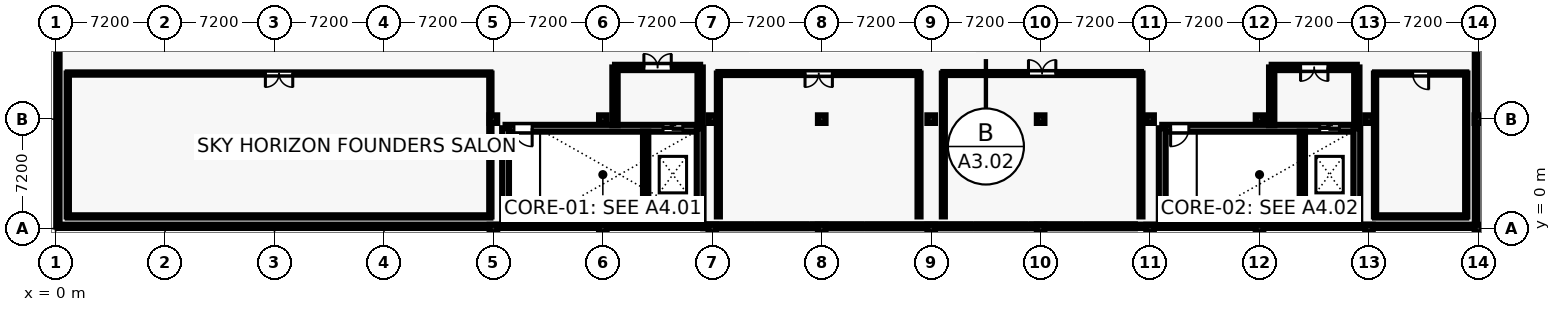
"""IFC4 building model, lengths in metres.
Left out: names, types, materials, properties, quantities, classifications, styles, units other than length and angle.
Written with IfcOpenShell. Run it as: python <this file> out.ifc"""

import sys

from ifc_helpers import new_model, si_unit, direction, frame, frame_2d, origin, origin_2d, place, context, subcontext, project, spatial, rectangle, extrude, element, fill, save


model = new_model("IFC4")
c1 = context("Model", 3, precision=1e-05, world=origin(), true_north=direction((0.0, 1.0)))
c2 = subcontext(c1, "Body", "Model", "MODEL_VIEW")
j1 = project(units=[si_unit("LENGTHUNIT", "METRE"), si_unit("PLANEANGLEUNIT", "RADIAN")], contexts=[c1])
p1 = place(None, origin())
s1 = spatial("IfcSite", under=j1, at=p1, CompositionType="ELEMENT")
p2 = place(p1, origin())
s2 = spatial("IfcBuilding", under=s1, at=p2, CompositionType="ELEMENT")
p3 = place(p2, frame((0.0, 0.0, 23.0)))
s3 = spatial("IfcBuildingStorey", under=s2, at=p3, CompositionType="ELEMENT", Elevation=23.0)
for number, where, z_axis, x_axis in (
    (1, (28.8, 0.0, 0.0), (0.0, 0.0, 1.0), (1.0, 0.0, 0.0)),
    (2, (28.8, 7.2, 0.0), (0.0, 0.0, 1.0), (1.0, 0.0, 0.0)),
    (3, (36.0, 0.0, 0.0), (0.0, 0.0, 1.0), (1.0, 0.0, 0.0)),
    (4, (36.0, 7.2, 0.0), (0.0, 0.0, 1.0), (1.0, 0.0, 0.0)),
    (5, (43.2, 0.0, 0.0), (0.0, 0.0, 1.0), (1.0, 0.0, 0.0)),
    (6, (43.2, 7.2, 0.0), (0.0, 0.0, 1.0), (1.0, 0.0, 0.0)),
    (7, (50.4, 0.0, 0.0), (0.0, 0.0, 1.0), (1.0, 0.0, 0.0)),
    (8, (50.4, 7.2, 0.0), (0.0, 0.0, 1.0), (1.0, 0.0, 0.0)),
    (9, (57.6, 0.0, 0.0), (0.0, 0.0, 1.0), (1.0, 0.0, 0.0)),
    (10, (57.6, 7.2, 0.0), (0.0, 0.0, 1.0), (1.0, 0.0, 0.0)),
    (11, (64.8, 0.0, 0.0), (0.0, 0.0, 1.0), (1.0, 0.0, 0.0)),
    (12, (64.8, 7.2, 0.0), (0.0, 0.0, 1.0), (1.0, 0.0, 0.0)),
    (13, (72.0, 0.0, 0.0), (0.0, 0.0, 1.0), (1.0, 0.0, 0.0)),
    (14, (72.0, 7.2, 0.0), (0.0, 0.0, 1.0), (1.0, 0.0, 0.0)),
    (15, (79.2, 0.0, 0.0), (0.0, 0.0, 1.0), (1.0, 0.0, 0.0)),
    (16, (79.2, 7.2, 0.0), (0.0, 0.0, 1.0), (1.0, 0.0, 0.0)),
    (17, (86.4, 0.0, 0.0), (0.0, 0.0, 1.0), (1.0, 0.0, 0.0)),
    (18, (86.4, 7.2, 0.0), (0.0, 0.0, 1.0), (1.0, 0.0, 0.0)),
    (19, (93.6, 0.0, 0.0), (0.0, 0.0, 1.0), (1.0, 0.0, 0.0)),
    (20, (93.6, 7.2, 0.0), (0.0, 0.0, 1.0), (1.0, 0.0, 0.0)),
):
    element("IfcColumn", number, at=place(p3, frame(where, z_axis=z_axis, x_axis=x_axis)), inside=s3, PredefinedType="COLUMN", context=c2, shape_type="SweptSolid", body=[
        extrude(rectangle(XDim=0.5, YDim=0.5, at=origin_2d()), origin(), (0.0, 0.0, 1.0), 4.5),
    ])
p4 = place(p3, frame((29.6, 0.5, 0.0), z_axis=(0.0, 0.0, 1.0), x_axis=(1.0, 0.0, 0.0)))
e21 = element("IfcWall", 21, at=p4, inside=s3, PredefinedType="SHEAR", context=c2, shape_type="SweptSolid", body=[
    extrude(rectangle(XDim=12.8, YDim=0.45, at=frame_2d((6.4, 0.0))), origin(), (0.0, 0.0, 1.0), 4.28),
])
p5 = place(p3, frame((29.6, 6.6, 0.0), z_axis=(0.0, 0.0, 1.0), x_axis=(1.0, 0.0, 0.0)))
e22 = element("IfcWall", 22, at=p5, inside=s3, PredefinedType="SHEAR", context=c2, shape_type="SweptSolid", body=[
    extrude(rectangle(XDim=12.8, YDim=0.45, at=frame_2d((6.4, 0.0))), origin(), (0.0, 0.0, 1.0), 4.28),
])
p6 = place(p5, frame((0.55, 0.0, 0.0)))
e23 = element("IfcOpeningElement", 23, at=p6, cuts=e22, PredefinedType="OPENING", context=c2, shape_type="SweptSolid", body=[
    extrude(rectangle(XDim=1.2, YDim=2.25, at=frame_2d((0.6, 1.125))), frame((0.0, 0.235, 0.0), z_axis=(0.0, -1.0, 0.0), x_axis=(1.0, 0.0, 0.0)), (0.0, 0.0, 1.0), 0.47),
])
p7 = place(p5, frame((10.358, 0.0, 0.0)))
e24 = element("IfcOpeningElement", 24, at=p7, cuts=e22, PredefinedType="OPENING", context=c2, shape_type="SweptSolid", body=[
    extrude(rectangle(XDim=1.3, YDim=2.25, at=frame_2d((0.65, 1.125))), frame((0.0, 0.235, 0.0), z_axis=(0.0, -1.0, 0.0), x_axis=(1.0, 0.0, 0.0)), (0.0, 0.0, 1.0), 0.47),
])
for number, where, z_axis, x_axis in (
    (25, (29.6, 0.5, 0.0), (0.0, 0.0, 1.0), (0.0, 1.0, 0.0)),
    (26, (42.4, 0.5, 0.0), (0.0, 0.0, 1.0), (0.0, 1.0, 0.0)),
):
    element("IfcWall", number, at=place(p3, frame(where, z_axis=z_axis, x_axis=x_axis)), inside=s3, PredefinedType="SHEAR", context=c2, shape_type="SweptSolid", body=[
        extrude(rectangle(XDim=6.1, YDim=0.45, at=frame_2d((3.05, 0.0))), origin(), (0.0, 0.0, 1.0), 4.28),
    ])
p8 = place(p3, frame((38.816, 0.725, 0.0), z_axis=(0.0, 0.0, 1.0), x_axis=(0.0, 1.0, 0.0)))
e27 = element("IfcWall", 27, at=p8, inside=s3, PredefinedType="SHEAR", context=c2, shape_type="SweptSolid", body=[
    extrude(rectangle(XDim=5.65, YDim=0.35, at=frame_2d((2.825, 0.0))), origin(), (0.0, 0.0, 1.0), 4.28),
])
p9 = place(p3, frame((72.8, 0.5, 0.0), z_axis=(0.0, 0.0, 1.0), x_axis=(1.0, 0.0, 0.0)))
e28 = element("IfcWall", 28, at=p9, inside=s3, PredefinedType="SHEAR", context=c2, shape_type="SweptSolid", body=[
    extrude(rectangle(XDim=12.8, YDim=0.45, at=frame_2d((6.4, 0.0))), origin(), (0.0, 0.0, 1.0), 4.28),
])
p10 = place(p3, frame((72.8, 6.6, 0.0), z_axis=(0.0, 0.0, 1.0), x_axis=(1.0, 0.0, 0.0)))
e29 = element("IfcWall", 29, at=p10, inside=s3, PredefinedType="SHEAR", context=c2, shape_type="SweptSolid", body=[
    extrude(rectangle(XDim=12.8, YDim=0.45, at=frame_2d((6.4, 0.0))), origin(), (0.0, 0.0, 1.0), 4.28),
])
p11 = place(p10, frame((0.55, 0.0, 0.0)))
e30 = element("IfcOpeningElement", 30, at=p11, cuts=e29, PredefinedType="OPENING", context=c2, shape_type="SweptSolid", body=[
    extrude(rectangle(XDim=1.2, YDim=2.25, at=frame_2d((0.6, 1.125))), frame((0.0, 0.235, 0.0), z_axis=(0.0, -1.0, 0.0), x_axis=(1.0, 0.0, 0.0)), (0.0, 0.0, 1.0), 0.47),
])
p12 = place(p10, frame((10.358, 0.0, 0.0)))
e31 = element("IfcOpeningElement", 31, at=p12, cuts=e29, PredefinedType="OPENING", context=c2, shape_type="SweptSolid", body=[
    extrude(rectangle(XDim=1.3, YDim=2.25, at=frame_2d((0.65, 1.125))), frame((0.0, 0.235, 0.0), z_axis=(0.0, -1.0, 0.0), x_axis=(1.0, 0.0, 0.0)), (0.0, 0.0, 1.0), 0.47),
])
for number, where, z_axis, x_axis in (
    (32, (72.8, 0.5, 0.0), (0.0, 0.0, 1.0), (0.0, 1.0, 0.0)),
    (33, (85.6, 0.5, 0.0), (0.0, 0.0, 1.0), (0.0, 1.0, 0.0)),
):
    element("IfcWall", number, at=place(p3, frame(where, z_axis=z_axis, x_axis=x_axis)), inside=s3, PredefinedType="SHEAR", context=c2, shape_type="SweptSolid", body=[
        extrude(rectangle(XDim=6.1, YDim=0.45, at=frame_2d((3.05, 0.0))), origin(), (0.0, 0.0, 1.0), 4.28),
    ])
p13 = place(p3, frame((82.016, 0.725, 0.0), z_axis=(0.0, 0.0, 1.0), x_axis=(0.0, 1.0, 0.0)))
e34 = element("IfcWall", 34, at=p13, inside=s3, PredefinedType="SHEAR", context=c2, shape_type="SweptSolid", body=[
    extrude(rectangle(XDim=5.65, YDim=0.35, at=frame_2d((2.825, 0.0))), origin(), (0.0, 0.0, 1.0), 4.28),
])
for number, where, z_axis, x_axis in (
    (35, (42.6, 0.15, 0.0), (0.0, 0.0, 1.0), (1.0, 0.0, 0.0)),
    (36, (46.2, 0.15, 0.0), (0.0, 0.0, 1.0), (1.0, 0.0, 0.0)),
    (37, (49.8, 0.15, 0.0), (0.0, 0.0, 1.0), (1.0, 0.0, 0.0)),
):
    element("IfcWall", number, at=place(p3, frame(where, z_axis=z_axis, x_axis=x_axis)), inside=s3, PredefinedType="SOLIDWALL", context=c2, shape_type="SweptSolid", body=[
        extrude(rectangle(XDim=3.2, YDim=0.26, at=frame_2d((1.6, 0.0))), origin(), (0.0, 0.0, 1.0), 3.34),
    ])
p14 = place(p3, frame((53.4, 0.15, 0.0), z_axis=(0.0, 0.0, 1.0), x_axis=(1.0, 0.0, 0.0)))
e38 = element("IfcWall", 38, at=p14, inside=s3, PredefinedType="SOLIDWALL", context=c2, shape_type="SweptSolid", body=[
    extrude(rectangle(XDim=3.2, YDim=0.26, at=frame_2d((1.6, 0.0))), origin(), (0.0, 0.0, 1.0), 3.34),
])
for number, where, z_axis, x_axis in (
    (39, (57.0, 0.15, 0.0), (0.0, 0.0, 1.0), (1.0, 0.0, 0.0)),
    (40, (60.6, 0.15, 0.0), (0.0, 0.0, 1.0), (1.0, 0.0, 0.0)),
    (41, (64.2, 0.15, 0.0), (0.0, 0.0, 1.0), (1.0, 0.0, 0.0)),
    (42, (67.8, 0.15, 0.0), (0.0, 0.0, 1.0), (1.0, 0.0, 0.0)),
):
    element("IfcWall", number, at=place(p3, frame(where, z_axis=z_axis, x_axis=x_axis)), inside=s3, PredefinedType="SOLIDWALL", context=c2, shape_type="SweptSolid", body=[
        extrude(rectangle(XDim=3.2, YDim=0.26, at=frame_2d((1.6, 0.0))), origin(), (0.0, 0.0, 1.0), 3.34),
    ])
p15 = place(p3, frame((0.15, 0.15, 4.5), z_axis=(0.0, 0.0, 1.0), x_axis=(0.0, 1.0, 0.0)))
e43 = element("IfcWall", 43, at=p15, inside=s3, PredefinedType="PARAPET", context=c2, shape_type="SweptSolid", body=[
    extrude(rectangle(XDim=129.3, YDim=0.22, at=frame_2d((64.65, 0.0))), origin(), (0.0, 0.0, 1.0), 1.15),
])
p16 = place(p3, frame((0.15, 0.15, 4.5), z_axis=(0.0, 0.0, 1.0), x_axis=(1.0, 0.0, 0.0)))
e44 = element("IfcWall", 44, at=p16, inside=s3, PredefinedType="PARAPET", context=c2, shape_type="SweptSolid", body=[
    extrude(rectangle(XDim=93.3, YDim=0.22, at=frame_2d((46.65, 0.0))), origin(), (0.0, 0.0, 1.0), 1.15),
])
p17 = place(p3, frame((93.45, 0.15, 4.5), z_axis=(0.0, 0.0, 1.0), x_axis=(0.0, 1.0, 0.0)))
e45 = element("IfcWall", 45, at=p17, inside=s3, PredefinedType="PARAPET", context=c2, shape_type="SweptSolid", body=[
    extrude(rectangle(XDim=14.1, YDim=0.18, at=frame_2d((7.05, 0.0))), origin(), (0.0, 0.0, 1.0), 1.15),
])
p18 = place(p3, frame((42.4, 6.8, 0.0), z_axis=(0.0, 0.0, 1.0), x_axis=(0.0, 1.0, 0.0)))
e46 = element("IfcWall", 46, at=p18, inside=s3, PredefinedType="SHEAR", context=c2, shape_type="SweptSolid", body=[
    extrude(rectangle(XDim=3.8, YDim=0.35, at=frame_2d((1.9, 0.0))), origin(), (0.0, 0.0, 1.0), 3.34),
])
p19 = place(p3, frame((42.4, 10.6, 0.0), z_axis=(0.0, 0.0, 1.0), x_axis=(-1.0, 0.0, 0.0)))
e47 = element("IfcWall", 47, at=p19, inside=s3, PredefinedType="SHEAR", context=c2, shape_type="SweptSolid", body=[
    extrude(rectangle(XDim=5.6, YDim=0.35, at=frame_2d((2.8, 0.0))), origin(), (0.0, 0.0, 1.0), 3.34),
])
p20 = place(p19, frame((1.9, 0.0, 0.0)))
e48 = element("IfcOpeningElement", 48, at=p20, cuts=e47, PredefinedType="OPENING", context=c2, shape_type="SweptSolid", body=[
    extrude(rectangle(XDim=1.8, YDim=2.3, at=frame_2d((0.9, 1.15))), frame((0.0, 0.185, 0.0), z_axis=(0.0, -1.0, 0.0), x_axis=(1.0, 0.0, 0.0)), (0.0, 0.0, 1.0), 0.37),
])
for number, where, z_axis, x_axis in (
    (49, (36.8, 10.6, 0.0), (0.0, 0.0, 1.0), (0.0, -1.0, 0.0)),
    (50, (85.6, 6.8, 0.0), (0.0, 0.0, 1.0), (0.0, 1.0, 0.0)),
):
    element("IfcWall", number, at=place(p3, frame(where, z_axis=z_axis, x_axis=x_axis)), inside=s3, PredefinedType="SHEAR", context=c2, shape_type="SweptSolid", body=[
        extrude(rectangle(XDim=3.8, YDim=0.35, at=frame_2d((1.9, 0.0))), origin(), (0.0, 0.0, 1.0), 3.34),
    ])
p21 = place(p3, frame((85.6, 10.6, 0.0), z_axis=(0.0, 0.0, 1.0), x_axis=(-1.0, 0.0, 0.0)))
e51 = element("IfcWall", 51, at=p21, inside=s3, PredefinedType="SHEAR", context=c2, shape_type="SweptSolid", body=[
    extrude(rectangle(XDim=5.6, YDim=0.35, at=frame_2d((2.8, 0.0))), origin(), (0.0, 0.0, 1.0), 3.34),
])
p22 = place(p21, frame((1.9, 0.0, 0.0)))
e52 = element("IfcOpeningElement", 52, at=p22, cuts=e51, PredefinedType="OPENING", context=c2, shape_type="SweptSolid", body=[
    extrude(rectangle(XDim=1.8, YDim=2.3, at=frame_2d((0.9, 1.15))), frame((0.0, 0.185, 0.0), z_axis=(0.0, -1.0, 0.0), x_axis=(1.0, 0.0, 0.0)), (0.0, 0.0, 1.0), 0.37),
])
p23 = place(p3, frame((80.0, 10.6, 0.0), z_axis=(0.0, 0.0, 1.0), x_axis=(0.0, -1.0, 0.0)))
e53 = element("IfcWall", 53, at=p23, inside=s3, PredefinedType="SHEAR", context=c2, shape_type="SweptSolid", body=[
    extrude(rectangle(XDim=3.8, YDim=0.35, at=frame_2d((1.9, 0.0))), origin(), (0.0, 0.0, 1.0), 3.34),
])
p24 = place(p3, frame((0.8, 0.8, 0.0), z_axis=(0.0, 0.0, 1.0), x_axis=(1.0, 0.0, 0.0)))
e54 = element("IfcWall", 54, at=p24, inside=s3, PredefinedType="PARTITIONING", context=c2, shape_type="SweptSolid", body=[
    extrude(rectangle(XDim=27.8, YDim=0.15, at=frame_2d((13.9, 0.0))), origin(), (0.0, 0.0, 1.0), 3.34),
])
p25 = place(p3, frame((28.6, 0.8, 0.0), z_axis=(0.0, 0.0, 1.0), x_axis=(0.0, 1.0, 0.0)))
e55 = element("IfcWall", 55, at=p25, inside=s3, PredefinedType="PARTITIONING", context=c2, shape_type="SweptSolid", body=[
    extrude(rectangle(XDim=9.4, YDim=0.15, at=frame_2d((4.7, 0.0))), origin(), (0.0, 0.0, 1.0), 3.34),
])
p26 = place(p3, frame((28.6, 10.2, 0.0), z_axis=(0.0, 0.0, 1.0), x_axis=(-1.0, 0.0, 0.0)))
e56 = element("IfcWall", 56, at=p26, inside=s3, PredefinedType="PARTITIONING", context=c2, shape_type="SweptSolid", body=[
    extrude(rectangle(XDim=27.8, YDim=0.15, at=frame_2d((13.9, 0.0))), origin(), (0.0, 0.0, 1.0), 3.34),
])
p27 = place(p26, frame((13.0, 0.0, 0.0)))
e57 = element("IfcOpeningElement", 57, at=p27, cuts=e56, PredefinedType="OPENING", context=c2, shape_type="SweptSolid", body=[
    extrude(rectangle(XDim=1.8, YDim=2.3, at=frame_2d((0.9, 1.15))), frame((0.0, 0.085, 0.0), z_axis=(0.0, -1.0, 0.0), x_axis=(1.0, 0.0, 0.0)), (0.0, 0.0, 1.0), 0.17),
])
p28 = place(p3, frame((0.8, 10.2, 0.0), z_axis=(0.0, 0.0, 1.0), x_axis=(0.0, -1.0, 0.0)))
e58 = element("IfcWall", 58, at=p28, inside=s3, PredefinedType="PARTITIONING", context=c2, shape_type="SweptSolid", body=[
    extrude(rectangle(XDim=9.4, YDim=0.15, at=frame_2d((4.7, 0.0))), origin(), (0.0, 0.0, 1.0), 3.34),
])
p29 = place(p3, frame((56.8, 0.8, 0.0), z_axis=(0.0, 0.0, 1.0), x_axis=(0.0, 1.0, 0.0)))
e59 = element("IfcWall", 59, at=p29, inside=s3, PredefinedType="PARTITIONING", context=c2, shape_type="SweptSolid", body=[
    extrude(rectangle(XDim=9.4, YDim=0.2, at=frame_2d((4.7, 0.0))), origin(), (0.0, 0.0, 1.0), 3.34),
])
p30 = place(p3, frame((56.8, 10.2, 0.0), z_axis=(0.0, 0.0, 1.0), x_axis=(-1.0, 0.0, 0.0)))
e60 = element("IfcWall", 60, at=p30, inside=s3, PredefinedType="PARTITIONING", context=c2, shape_type="SweptSolid", body=[
    extrude(rectangle(XDim=13.2, YDim=0.2, at=frame_2d((6.6, 0.0))), origin(), (0.0, 0.0, 1.0), 3.34),
])
p31 = place(p30, frame((5.7, 0.0, 0.0)))
e61 = element("IfcOpeningElement", 61, at=p31, cuts=e60, PredefinedType="OPENING", context=c2, shape_type="SweptSolid", body=[
    extrude(rectangle(XDim=1.8, YDim=2.3, at=frame_2d((0.9, 1.15))), frame((0.0, 0.11, 0.0), z_axis=(0.0, -1.0, 0.0), x_axis=(1.0, 0.0, 0.0)), (0.0, 0.0, 1.0), 0.22),
])
for number, where, z_axis, x_axis in (
    (62, (43.6, 10.2, 0.0), (0.0, 0.0, 1.0), (0.0, -1.0, 0.0)),
    (63, (71.4, 0.8, 0.0), (0.0, 0.0, 1.0), (0.0, 1.0, 0.0)),
):
    element("IfcWall", number, at=place(p3, frame(where, z_axis=z_axis, x_axis=x_axis)), inside=s3, PredefinedType="PARTITIONING", context=c2, shape_type="SweptSolid", body=[
        extrude(rectangle(XDim=9.4, YDim=0.2, at=frame_2d((4.7, 0.0))), origin(), (0.0, 0.0, 1.0), 3.34),
    ])
p32 = place(p3, frame((71.4, 10.2, 0.0), z_axis=(0.0, 0.0, 1.0), x_axis=(-1.0, 0.0, 0.0)))
e64 = element("IfcWall", 64, at=p32, inside=s3, PredefinedType="PARTITIONING", context=c2, shape_type="SweptSolid", body=[
    extrude(rectangle(XDim=13.0, YDim=0.2, at=frame_2d((6.5, 0.0))), origin(), (0.0, 0.0, 1.0), 3.34),
])
p33 = place(p32, frame((5.6, 0.0, 0.0)))
e65 = element("IfcOpeningElement", 65, at=p33, cuts=e64, PredefinedType="OPENING", context=c2, shape_type="SweptSolid", body=[
    extrude(rectangle(XDim=1.8, YDim=2.3, at=frame_2d((0.9, 1.15))), frame((0.0, 0.11, 0.0), z_axis=(0.0, -1.0, 0.0), x_axis=(1.0, 0.0, 0.0)), (0.0, 0.0, 1.0), 0.22),
])
p34 = place(p3, frame((58.4, 10.2, 0.0), z_axis=(0.0, 0.0, 1.0), x_axis=(0.0, -1.0, 0.0)))
e66 = element("IfcWall", 66, at=p34, inside=s3, PredefinedType="PARTITIONING", context=c2, shape_type="SweptSolid", body=[
    extrude(rectangle(XDim=9.4, YDim=0.2, at=frame_2d((4.7, 0.0))), origin(), (0.0, 0.0, 1.0), 3.34),
])
p35 = place(p3, frame((86.8, 0.8, 0.0), z_axis=(0.0, 0.0, 1.0), x_axis=(1.0, 0.0, 0.0)))
e67 = element("IfcWall", 67, at=p35, inside=s3, PredefinedType="PARTITIONING", context=c2, shape_type="SweptSolid", body=[
    extrude(rectangle(XDim=6.0, YDim=0.15, at=frame_2d((3.0, 0.0))), origin(), (0.0, 0.0, 1.0), 3.34),
])
p36 = place(p3, frame((92.8, 0.8, 0.0), z_axis=(0.0, 0.0, 1.0), x_axis=(0.0, 1.0, 0.0)))
e68 = element("IfcWall", 68, at=p36, inside=s3, PredefinedType="PARTITIONING", context=c2, shape_type="SweptSolid", body=[
    extrude(rectangle(XDim=9.4, YDim=0.15, at=frame_2d((4.7, 0.0))), origin(), (0.0, 0.0, 1.0), 3.34),
])
p37 = place(p3, frame((92.8, 10.2, 0.0), z_axis=(0.0, 0.0, 1.0), x_axis=(-1.0, 0.0, 0.0)))
e69 = element("IfcWall", 69, at=p37, inside=s3, PredefinedType="PARTITIONING", context=c2, shape_type="SweptSolid", body=[
    extrude(rectangle(XDim=6.0, YDim=0.15, at=frame_2d((3.0, 0.0))), origin(), (0.0, 0.0, 1.0), 3.34),
])
p38 = place(p37, frame((2.475, 0.0, 0.0)))
e70 = element("IfcOpeningElement", 70, at=p38, cuts=e69, PredefinedType="OPENING", context=c2, shape_type="SweptSolid", body=[
    extrude(rectangle(XDim=1.05, YDim=2.2, at=frame_2d((0.525, 1.1))), frame((0.0, 0.085, 0.0), z_axis=(0.0, -1.0, 0.0), x_axis=(1.0, 0.0, 0.0)), (0.0, 0.0, 1.0), 0.17),
])
p39 = place(p3, frame((86.8, 10.2, 0.0), z_axis=(0.0, 0.0, 1.0), x_axis=(0.0, -1.0, 0.0)))
e71 = element("IfcWall", 71, at=p39, inside=s3, PredefinedType="PARTITIONING", context=c2, shape_type="SweptSolid", body=[
    extrude(rectangle(XDim=9.4, YDim=0.15, at=frame_2d((4.7, 0.0))), origin(), (0.0, 0.0, 1.0), 3.34),
])
p40 = place(p6, frame((1.2, 0.0, 0.0), z_axis=(0.0, 0.0, 1.0), x_axis=(-1.0, 0.0, 0.0)))
e72 = element("IfcDoor", 72, at=p40, inside=s3, OperationType="SINGLE_SWING_RIGHT", PredefinedType="DOOR", context=c2, shape_type="SweptSolid", body=[
    extrude(rectangle(XDim=1.2, YDim=2.25, at=frame_2d((0.6, 1.125))), frame((0.0, 0.025, 0.0), z_axis=(0.0, -1.0, 0.0), x_axis=(1.0, 0.0, 0.0)), (0.0, 0.0, 1.0), 0.05),
])
fill(e23, e72)
p41 = place(p7, origin())
e73 = element("IfcDoor", 73, at=p41, inside=s3, OperationType="SLIDING_TO_LEFT", PredefinedType="DOOR", context=c2, shape_type="SweptSolid", body=[
    extrude(rectangle(XDim=1.3, YDim=2.25, at=frame_2d((0.65, 1.125))), frame((0.0, 0.025, 0.0), z_axis=(0.0, -1.0, 0.0), x_axis=(1.0, 0.0, 0.0)), (0.0, 0.0, 1.0), 0.05),
])
fill(e24, e73)
p42 = place(p11, frame((1.2, 0.0, 0.0), z_axis=(0.0, 0.0, 1.0), x_axis=(-1.0, 0.0, 0.0)))
e74 = element("IfcDoor", 74, at=p42, inside=s3, OperationType="SINGLE_SWING_LEFT", PredefinedType="DOOR", context=c2, shape_type="SweptSolid", body=[
    extrude(rectangle(XDim=1.2, YDim=2.25, at=frame_2d((0.6, 1.125))), frame((0.0, 0.025, 0.0), z_axis=(0.0, -1.0, 0.0), x_axis=(1.0, 0.0, 0.0)), (0.0, 0.0, 1.0), 0.05),
])
fill(e30, e74)
p43 = place(p12, origin())
e75 = element("IfcDoor", 75, at=p43, inside=s3, OperationType="SLIDING_TO_LEFT", PredefinedType="DOOR", context=c2, shape_type="SweptSolid", body=[
    extrude(rectangle(XDim=1.3, YDim=2.25, at=frame_2d((0.65, 1.125))), frame((0.0, 0.025, 0.0), z_axis=(0.0, -1.0, 0.0), x_axis=(1.0, 0.0, 0.0)), (0.0, 0.0, 1.0), 0.05),
])
fill(e31, e75)
p44 = place(p20, frame((1.8, 0.0, 0.0), z_axis=(0.0, 0.0, 1.0), x_axis=(-1.0, 0.0, 0.0)))
e76 = element("IfcDoor", 76, at=p44, inside=s3, OperationType="DOUBLE_DOOR_SINGLE_SWING", PredefinedType="DOOR", context=c2, shape_type="SweptSolid", body=[
    extrude(rectangle(XDim=1.8, YDim=2.3, at=frame_2d((0.9, 1.15))), frame((0.0, 0.025, 0.0), z_axis=(0.0, -1.0, 0.0), x_axis=(1.0, 0.0, 0.0)), (0.0, 0.0, 1.0), 0.05),
])
fill(e48, e76)
p45 = place(p22, origin())
e77 = element("IfcDoor", 77, at=p45, inside=s3, OperationType="DOUBLE_DOOR_SINGLE_SWING", PredefinedType="DOOR", context=c2, shape_type="SweptSolid", body=[
    extrude(rectangle(XDim=1.8, YDim=2.3, at=frame_2d((0.9, 1.15))), frame((0.0, 0.025, 0.0), z_axis=(0.0, -1.0, 0.0), x_axis=(1.0, 0.0, 0.0)), (0.0, 0.0, 1.0), 0.05),
])
fill(e52, e77)
p46 = place(p27, origin())
e78 = element("IfcDoor", 78, at=p46, inside=s3, OperationType="DOUBLE_DOOR_SINGLE_SWING", PredefinedType="DOOR", context=c2, shape_type="SweptSolid", body=[
    extrude(rectangle(XDim=1.8, YDim=2.3, at=frame_2d((0.9, 1.15))), frame((0.0, 0.025, 0.0), z_axis=(0.0, -1.0, 0.0), x_axis=(1.0, 0.0, 0.0)), (0.0, 0.0, 1.0), 0.05),
])
fill(e57, e78)
p47 = place(p31, origin())
e79 = element("IfcDoor", 79, at=p47, inside=s3, OperationType="DOUBLE_DOOR_SINGLE_SWING", PredefinedType="DOOR", context=c2, shape_type="SweptSolid", body=[
    extrude(rectangle(XDim=1.8, YDim=2.3, at=frame_2d((0.9, 1.15))), frame((0.0, 0.025, 0.0), z_axis=(0.0, -1.0, 0.0), x_axis=(1.0, 0.0, 0.0)), (0.0, 0.0, 1.0), 0.05),
])
fill(e61, e79)
p48 = place(p33, frame((1.8, 0.0, 0.0), z_axis=(0.0, 0.0, 1.0), x_axis=(-1.0, 0.0, 0.0)))
e80 = element("IfcDoor", 80, at=p48, inside=s3, OperationType="DOUBLE_DOOR_SINGLE_SWING", PredefinedType="DOOR", context=c2, shape_type="SweptSolid", body=[
    extrude(rectangle(XDim=1.8, YDim=2.3, at=frame_2d((0.9, 1.15))), frame((0.0, 0.025, 0.0), z_axis=(0.0, -1.0, 0.0), x_axis=(1.0, 0.0, 0.0)), (0.0, 0.0, 1.0), 0.05),
])
fill(e65, e80)
p49 = place(p38, origin())
e81 = element("IfcDoor", 81, at=p49, inside=s3, OperationType="SINGLE_SWING_LEFT", PredefinedType="DOOR", context=c2, shape_type="SweptSolid", body=[
    extrude(rectangle(XDim=1.05, YDim=2.2, at=frame_2d((0.525, 1.1))), frame((0.0, 0.025, 0.0), z_axis=(0.0, -1.0, 0.0), x_axis=(1.0, 0.0, 0.0)), (0.0, 0.0, 1.0), 0.05),
])
fill(e70, e81)
save(model, sys.argv[1])
